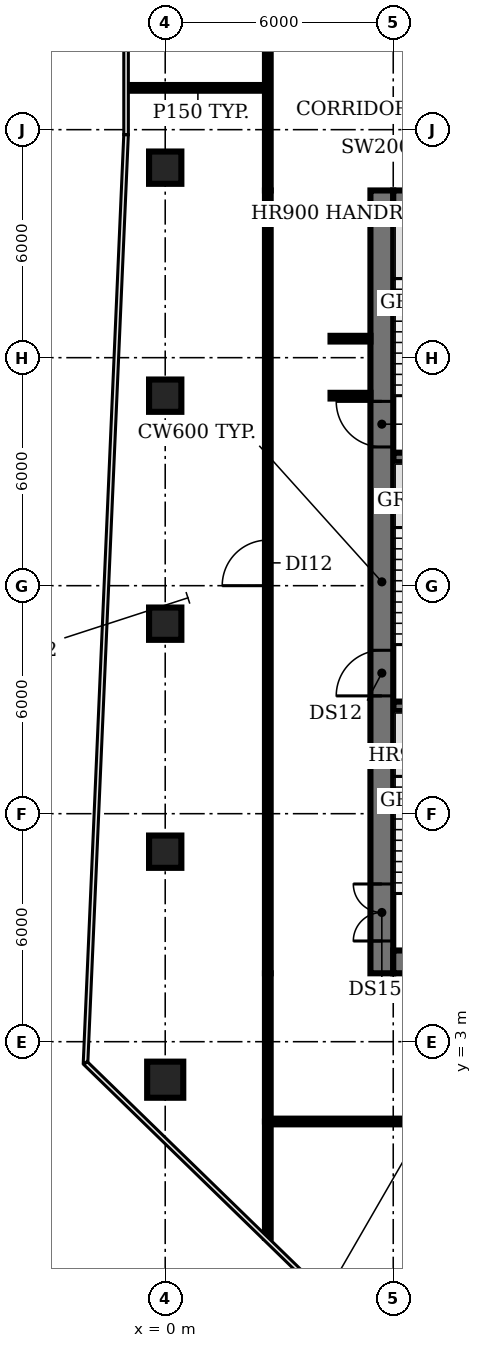
"""IFC4 building model, lengths in metres.
Left out: names, types, materials, properties, quantities, classifications, styles, units other than length and angle.
Written with IfcOpenShell. Run it as: python <this file> out.ifc"""

import sys

from ifc_helpers import new_model, si_unit, direction, frame, frame_2d, origin, origin_2d, place, context, subcontext, project, spatial, rectangle, circle, extrude, element, fill, save


model = new_model("IFC4")
c1 = context("Model", 3, precision=1e-05, world=origin(), true_north=direction((0.0, 1.0)))
c2 = subcontext(c1, "Body", "Model", "MODEL_VIEW")
j1 = project(units=[si_unit("LENGTHUNIT", "METRE"), si_unit("PLANEANGLEUNIT", "RADIAN")], contexts=[c1])
p1 = place(None, origin())
s1 = spatial("IfcSite", under=j1, at=p1, CompositionType="ELEMENT")
p2 = place(p1, origin())
s2 = spatial("IfcBuilding", under=s1, at=p2, CompositionType="ELEMENT")
p3 = place(p2, frame((0.0, 0.0, 159.2)))
s3 = spatial("IfcBuildingStorey", under=s2, at=p3, CompositionType="ELEMENT", Elevation=159.2)
p4 = place(p3, frame((0.0, 2.0, 0.0), z_axis=(0.0, 0.0, 1.0), x_axis=(1.0, 0.0, 0.0)))
e1 = element("IfcColumn", 1, at=p4, inside=s3, PredefinedType="COLUMN", context=c2, shape_type="SweptSolid", body=[
    extrude(circle(Radius=0.475, at=origin_2d()), origin(), (0.0, 0.0, 1.0), 3.85),
])
for number, where, z_axis, x_axis in (
    (2, (0.0, 8.0, 0.0), (0.0, 0.0, 1.0), (1.0, 0.0, 0.0)),
    (3, (0.0, 14.0, 0.0), (0.0, 0.0, 1.0), (1.0, 0.0, 0.0)),
    (4, (0.0, 20.0, 0.0), (0.0, 0.0, 1.0), (1.0, 0.0, 0.0)),
    (5, (0.0, 26.0, 0.0), (0.0, 0.0, 1.0), (1.0, 0.0, 0.0)),
):
    element("IfcColumn", number, at=place(p3, frame(where, z_axis=z_axis, x_axis=x_axis)), inside=s3, PredefinedType="COLUMN", context=c2, shape_type="SweptSolid", body=[
        extrude(rectangle(XDim=0.85, YDim=0.85, at=origin_2d()), origin(), (0.0, 0.0, 1.0), 3.85),
    ])
for number, where, z_axis, x_axis in (
    (6, (6.0, 11.825, 0.0), (0.0, 0.0, 1.0), (1.0, 0.0, 0.0)),
    (7, (6.0, 18.375, 0.0), (0.0, 0.0, 1.0), (1.0, 0.0, 0.0)),
):
    element("IfcWall", number, at=place(p3, frame(where, z_axis=z_axis, x_axis=x_axis)), inside=s3, PredefinedType="SHEAR", context=c2, shape_type="SweptSolid", body=[
        extrude(rectangle(XDim=3.15, YDim=0.25, at=frame_2d((1.575, 0.0))), origin(), (0.0, 0.0, 1.0), 3.85),
    ])
p5 = place(p3, frame((5.7, 4.8, 0.0), z_axis=(0.0, 0.0, 1.0), x_axis=(0.0, 1.0, 0.0)))
e8 = element("IfcWall", 8, at=p5, inside=s3, PredefinedType="SHEAR", context=c2, shape_type="SweptSolid", body=[
    extrude(rectangle(XDim=20.6, YDim=0.6, at=frame_2d((10.3, 0.0))), origin(), (0.0, 0.0, 1.0), 3.85),
])
p6 = place(p5, frame((0.85, 0.0, 0.0)))
e9 = element("IfcOpeningElement", 9, at=p6, cuts=e8, PredefinedType="OPENING", context=c2, shape_type="SweptSolid", body=[
    extrude(rectangle(XDim=1.5, YDim=2.1, at=frame_2d((0.75, 1.05))), frame((0.0, 0.31, 0.0), z_axis=(0.0, -1.0, 0.0), x_axis=(1.0, 0.0, 0.0)), (0.0, 0.0, 1.0), 0.62),
])
p7 = place(p5, frame((7.3, 0.0, 0.0)))
e10 = element("IfcOpeningElement", 10, at=p7, cuts=e8, PredefinedType="OPENING", context=c2, shape_type="SweptSolid", body=[
    extrude(rectangle(XDim=1.2, YDim=2.1, at=frame_2d((0.6, 1.05))), frame((0.0, 0.31, 0.0), z_axis=(0.0, -1.0, 0.0), x_axis=(1.0, 0.0, 0.0)), (0.0, 0.0, 1.0), 0.62),
])
p8 = place(p5, frame((13.85, 0.0, 0.0)))
e11 = element("IfcOpeningElement", 11, at=p8, cuts=e8, PredefinedType="OPENING", context=c2, shape_type="SweptSolid", body=[
    extrude(rectangle(XDim=1.2, YDim=2.1, at=frame_2d((0.6, 1.05))), frame((0.0, 0.31, 0.0), z_axis=(0.0, -1.0, 0.0), x_axis=(1.0, 0.0, 0.0)), (0.0, 0.0, 1.0), 0.62),
])
p9 = place(p3, frame((24.0, 5.1, 0.0), z_axis=(0.0, 0.0, 1.0), x_axis=(-1.0, 0.0, 0.0)))
e12 = element("IfcWall", 12, at=p9, inside=s3, PredefinedType="SHEAR", context=c2, shape_type="SweptSolid", body=[
    extrude(rectangle(XDim=18.0, YDim=0.6, at=frame_2d((9.0, 0.0))), origin(), (0.0, 0.0, 1.0), 3.85),
])
p10 = place(p9, frame((13.0, 0.0, 0.0)))
e13 = element("IfcOpeningElement", 13, at=p10, cuts=e12, PredefinedType="OPENING", context=c2, shape_type="SweptSolid", body=[
    extrude(rectangle(XDim=1.2, YDim=2.1, at=frame_2d((0.6, 1.05))), frame((0.0, 0.31, 0.0), z_axis=(0.0, -1.0, 0.0), x_axis=(1.0, 0.0, 0.0)), (0.0, 0.0, 1.0), 0.62),
])
p11 = place(p9, frame((4.9, 0.0, 0.0)))
e14 = element("IfcOpeningElement", 14, at=p11, cuts=e12, PredefinedType="OPENING", context=c2, shape_type="SweptSolid", body=[
    extrude(rectangle(XDim=1.0, YDim=2.1, at=frame_2d((0.5, 1.05))), frame((0.0, 0.31, 0.0), z_axis=(0.0, -1.0, 0.0), x_axis=(1.0, 0.0, 0.0)), (0.0, 0.0, 1.0), 0.62),
])
p12 = place(p3, frame((6.0, 25.1, 0.0), z_axis=(0.0, 0.0, 1.0), x_axis=(1.0, 0.0, 0.0)))
e15 = element("IfcWall", 15, at=p12, inside=s3, PredefinedType="SHEAR", context=c2, shape_type="SweptSolid", body=[
    extrude(rectangle(XDim=18.0, YDim=0.6, at=frame_2d((9.0, 0.0))), origin(), (0.0, 0.0, 1.0), 3.85),
])
p13 = place(p3, frame((-0.98, 28.1, 0.0), z_axis=(0.0, 0.0, 1.0), x_axis=(1.0, 0.0, 0.0)))
e16 = element("IfcWall", 16, at=p13, inside=s3, PredefinedType="PARTITIONING", context=c2, shape_type="SweptSolid", body=[
    extrude(rectangle(XDim=3.68, YDim=0.15, at=frame_2d((1.84, 0.0))), origin(), (0.0, 0.0, 1.0), 2.88),
])
p14 = place(p3, frame((2.7, -2.16, 0.0), z_axis=(0.0, 0.0, 1.0), x_axis=(0.0, 1.0, 0.0)))
e17 = element("IfcWall", 17, at=p14, inside=s3, PredefinedType="PARTITIONING", context=c2, shape_type="SweptSolid", body=[
    extrude(rectangle(XDim=3.06, YDim=0.15, at=frame_2d((1.53, 0.0))), origin(), (0.0, 0.0, 1.0), 2.88),
])
p15 = place(p3, frame((2.7, 0.9, 0.0), z_axis=(0.0, 0.0, 1.0), x_axis=(0.0, 1.0, 0.0)))
e18 = element("IfcWall", 18, at=p15, inside=s3, PredefinedType="PARTITIONING", context=c2, shape_type="SweptSolid", body=[
    extrude(rectangle(XDim=3.9, YDim=0.15, at=frame_2d((1.95, 0.0))), origin(), (0.0, 0.0, 1.0), 2.88),
])
p16 = place(p3, frame((2.7, 4.8, 0.0), z_axis=(0.0, 0.0, 1.0), x_axis=(0.0, 1.0, 0.0)))
e19 = element("IfcWall", 19, at=p16, inside=s3, PredefinedType="PARTITIONING", context=c2, shape_type="SweptSolid", body=[
    extrude(rectangle(XDim=20.6, YDim=0.15, at=frame_2d((10.3, 0.0))), origin(), (0.0, 0.0, 1.0), 2.88),
])
p17 = place(p16, frame((10.2, 0.0, 0.0)))
e20 = element("IfcOpeningElement", 20, at=p17, cuts=e19, PredefinedType="OPENING", context=c2, shape_type="SweptSolid", body=[
    extrude(rectangle(XDim=1.2, YDim=2.1, at=frame_2d((0.6, 1.05))), frame((0.0, 0.085, 0.0), z_axis=(0.0, -1.0, 0.0), x_axis=(1.0, 0.0, 0.0)), (0.0, 0.0, 1.0), 0.17),
])
p18 = place(p3, frame((2.7, 25.4, 0.0), z_axis=(0.0, 0.0, 1.0), x_axis=(0.0, 1.0, 0.0)))
e21 = element("IfcWall", 21, at=p18, inside=s3, PredefinedType="PARTITIONING", context=c2, shape_type="SweptSolid", body=[
    extrude(rectangle(XDim=3.9, YDim=0.15, at=frame_2d((1.95, 0.0))), origin(), (0.0, 0.0, 1.0), 2.88),
])
for number, where, z_axis, x_axis in (
    (22, (4.35, 20.0, 0.0), (0.0, 0.0, 1.0), (1.0, 0.0, 0.0)),
    (23, (4.35, 21.5, 0.0), (0.0, 0.0, 1.0), (1.0, 0.0, 0.0)),
):
    element("IfcWall", number, at=place(p3, frame(where, z_axis=z_axis, x_axis=x_axis)), inside=s3, PredefinedType="PARTITIONING", context=c2, shape_type="SweptSolid", body=[
        extrude(rectangle(XDim=1.05, YDim=0.15, at=frame_2d((0.525, 0.0))), origin(), (0.0, 0.0, 1.0), 2.88),
    ])
p19 = place(p3, frame((27.3, 0.9, 0.0), z_axis=(0.0, 0.0, 1.0), x_axis=(-1.0, 0.0, 0.0)))
e24 = element("IfcWall", 24, at=p19, inside=s3, PredefinedType="PARTITIONING", context=c2, shape_type="SweptSolid", body=[
    extrude(rectangle(XDim=24.6, YDim=0.15, at=frame_2d((12.3, 0.0))), origin(), (0.0, 0.0, 1.0), 2.88),
])
p20 = place(p19, frame((11.8, 0.0, 0.0)))
e25 = element("IfcOpeningElement", 25, at=p20, cuts=e24, PredefinedType="OPENING", context=c2, shape_type="SweptSolid", body=[
    extrude(rectangle(XDim=1.2, YDim=2.1, at=frame_2d((0.6, 1.05))), frame((0.0, 0.085, 0.0), z_axis=(0.0, -1.0, 0.0), x_axis=(1.0, 0.0, 0.0)), (0.0, 0.0, 1.0), 0.17),
])
p21 = place(p6, origin())
e26 = element("IfcDoor", 26, at=p21, inside=s3, OperationType="DOUBLE_DOOR_SINGLE_SWING", PredefinedType="DOOR", context=c2, shape_type="SweptSolid", body=[
    extrude(rectangle(XDim=1.5, YDim=2.1, at=frame_2d((0.75, 1.05))), frame((0.0, 0.025, 0.0), z_axis=(0.0, -1.0, 0.0), x_axis=(1.0, 0.0, 0.0)), (0.0, 0.0, 1.0), 0.05),
])
fill(e9, e26)
p22 = place(p7, origin())
e27 = element("IfcDoor", 27, at=p22, inside=s3, OperationType="SINGLE_SWING_LEFT", PredefinedType="DOOR", context=c2, shape_type="SweptSolid", body=[
    extrude(rectangle(XDim=1.2, YDim=2.1, at=frame_2d((0.6, 1.05))), frame((0.0, 0.025, 0.0), z_axis=(0.0, -1.0, 0.0), x_axis=(1.0, 0.0, 0.0)), (0.0, 0.0, 1.0), 0.05),
])
fill(e10, e27)
p23 = place(p8, origin())
e28 = element("IfcDoor", 28, at=p23, inside=s3, OperationType="SINGLE_SWING_RIGHT", PredefinedType="DOOR", context=c2, shape_type="SweptSolid", body=[
    extrude(rectangle(XDim=1.2, YDim=2.1, at=frame_2d((0.6, 1.05))), frame((0.0, 0.025, 0.0), z_axis=(0.0, -1.0, 0.0), x_axis=(1.0, 0.0, 0.0)), (0.0, 0.0, 1.0), 0.05),
])
fill(e11, e28)
p24 = place(p17, origin())
e29 = element("IfcDoor", 29, at=p24, inside=s3, OperationType="SINGLE_SWING_LEFT", PredefinedType="DOOR", context=c2, shape_type="SweptSolid", body=[
    extrude(rectangle(XDim=1.2, YDim=2.1, at=frame_2d((0.6, 1.05))), frame((0.0, 0.025, 0.0), z_axis=(0.0, -1.0, 0.0), x_axis=(1.0, 0.0, 0.0)), (0.0, 0.0, 1.0), 0.05),
])
fill(e20, e29)
save(model, sys.argv[1])
